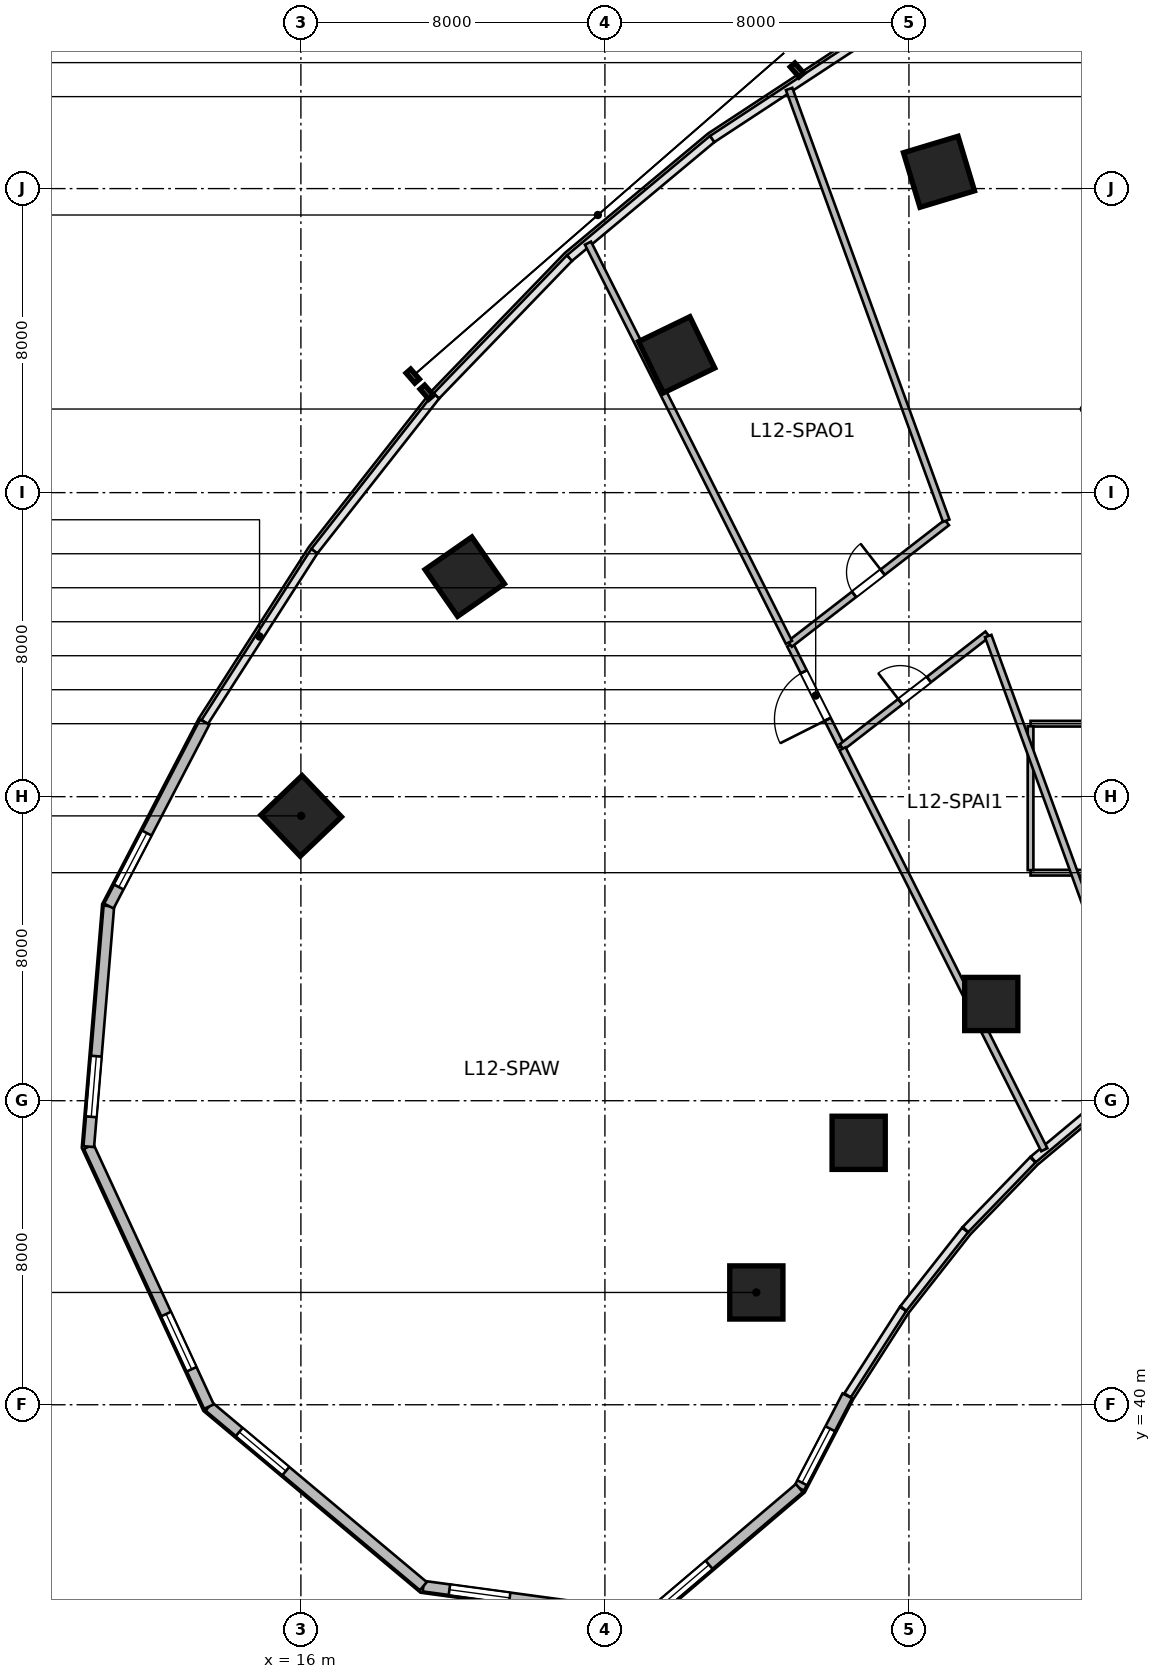
"""IFC4 building model, lengths in metres.
Left out: names, types, materials, properties, quantities, classifications, styles, units other than length and angle.
Written with IfcOpenShell. Run it as: python <this file> out.ifc"""

import sys

from ifc_helpers import new_model, si_unit, direction, frame, frame_2d, origin, origin_2d, place, context, subcontext, project, spatial, rectangle, circle, extrude, source, transform, mapped, element, fill, save


model = new_model("IFC4")
c1 = context("Model", 3, precision=1e-05, world=origin(), true_north=direction((0.0, 1.0)))
c2 = subcontext(c1, "Body", "Model", "MODEL_VIEW")
j1 = project(units=[si_unit("LENGTHUNIT", "METRE"), si_unit("PLANEANGLEUNIT", "RADIAN")], contexts=[c1])
p1 = place(None, origin())
s1 = spatial("IfcSite", under=j1, at=p1, CompositionType="ELEMENT")
p2 = place(p1, origin())
s2 = spatial("IfcBuilding", under=s1, at=p2, CompositionType="ELEMENT")
p3 = place(p2, frame((0.0, 0.0, 57.0)))
s3 = spatial("IfcBuildingStorey", under=s2, at=p3, CompositionType="ELEMENT", Elevation=57.0)
m1 = source(origin(), c2, "Body", "SweptSolid", [
    extrude(circle(Radius=0.7, at=origin_2d()), origin(), (0.0, 0.0, 1.0), 3.6),
])
p4 = place(p3, frame((27.985, 42.955, 0.0), z_axis=(0.0, 0.0, 1.0), x_axis=(-0.690756218984, 0.723087716626, 0.0)))
e1 = element("IfcColumn", 1, at=p4, inside=s3, PredefinedType="COLUMN", context=c2, shape_type="MappedRepresentation", body=[
    mapped(m1, transform((0.0, 0.0, 0.0), scale=1.0)),
])
m2 = source(origin(), c2, "Body", "SweptSolid", [
    extrude(rectangle(XDim=1.5, YDim=1.5, at=origin_2d()), origin(), (0.0, 0.0, 1.0), 3.6),
])
p5 = place(p3, frame((16.007, 55.494, 0.0), z_axis=(0.0, 0.0, 1.0), x_axis=(-0.690756218984, 0.723087716626, 0.0)))
e2 = element("IfcColumn", 2, at=p5, inside=s3, PredefinedType="COLUMN", context=c2, shape_type="MappedRepresentation", body=[
    mapped(m2, transform((0.0, 0.0, 0.0), scale=1.0)),
])
p6 = place(p3, frame((30.677, 46.892, 0.0), z_axis=(0.0, 0.0, 1.0), x_axis=(-0.571143442153, 0.820850271661, 0.0)))
e3 = element("IfcColumn", 3, at=p6, inside=s3, PredefinedType="COLUMN", context=c2, shape_type="MappedRepresentation", body=[
    mapped(m1, transform((0.0, 0.0, 0.0), scale=1.0)),
])
p7 = place(p3, frame((20.311, 61.789, 0.0), z_axis=(0.0, 0.0, 1.0), x_axis=(-0.571143442153, 0.820850271661, 0.0)))
e4 = element("IfcColumn", 4, at=p7, inside=s3, PredefinedType="COLUMN", context=c2, shape_type="MappedRepresentation", body=[
    mapped(m2, transform((0.0, 0.0, 0.0), scale=1.0)),
])
p8 = place(p3, frame((34.166, 50.545, 0.0), z_axis=(0.0, 0.0, 1.0), x_axis=(-0.436173672171, 0.899862504889, 0.0)))
e5 = element("IfcColumn", 5, at=p8, inside=s3, PredefinedType="COLUMN", context=c2, shape_type="MappedRepresentation", body=[
    mapped(m1, transform((0.0, 0.0, 0.0), scale=1.0)),
])
for number, where, z_axis, x_axis in (
    (6, (25.888, 67.627, 0.0), (0.0, 0.0, 1.0), (-0.436, 0.9, 0.0)),
    (7, (32.791, 72.442, 0.0), (0.0, 0.0, 1.0), (-0.289, 0.957, 0.0)),
):
    element("IfcColumn", number, at=place(p3, frame(where, z_axis=z_axis, x_axis=x_axis)), inside=s3, PredefinedType="COLUMN", context=c2, shape_type="MappedRepresentation", body=[
        mapped(m2, transform((0.0, 0.0, 0.0), scale=1.0)),
    ])
m3 = source(origin(), c2, "Body", "SweptSolid", [
    extrude(rectangle(XDim=2.735, YDim=0.28, at=frame_2d((1.368, 0.0))), origin(), (0.0, 0.0, 1.0), 3.36),
])
p9 = place(p3, frame((30.378, 40.234, 0.0), z_axis=(0.0, 0.0, 1.0), x_axis=(-0.46179107292, -0.886988728774, 0.0)))
e8 = element("IfcWall", 8, at=p9, inside=s3, PredefinedType="SOLIDWALL", context=c2, shape_type="MappedRepresentation", body=[
    mapped(m3, transform((0.0, 0.0, 0.0), scale=1.0)),
])
p10 = place(p9, frame((0.976, 0.0, 0.95)))
e9 = element("IfcOpeningElement", 9, at=p10, cuts=e8, PredefinedType="OPENING", context=c2, shape_type="SweptSolid", body=[
    extrude(rectangle(XDim=1.6, YDim=1.9, at=frame_2d((0.8, 0.95))), frame((0.0, 0.15, 0.0), z_axis=(0.0, -1.0, 0.0), x_axis=(1.0, 0.0, 0.0)), (0.0, 0.0, 1.0), 0.3),
])
m4 = source(origin(), c2, "Body", "SweptSolid", [
    extrude(rectangle(XDim=5.222, YDim=0.28, at=frame_2d((2.611, 0.0))), origin(), (0.0, 0.0, 1.0), 3.36),
])
p11 = place(p3, frame((29.115, 37.807, 0.0), z_axis=(0.0, 0.0, 1.0), x_axis=(-0.761900099546, -0.647694556339, 0.0)))
e10 = element("IfcWall", 10, at=p11, inside=s3, PredefinedType="SOLIDWALL", context=c2, shape_type="MappedRepresentation", body=[
    mapped(m4, transform((0.0, 0.0, 0.0), scale=1.0)),
])
p12 = place(p11, frame((3.117, 0.0, 0.95)))
e11 = element("IfcOpeningElement", 11, at=p12, cuts=e10, PredefinedType="OPENING", context=c2, shape_type="SweptSolid", body=[
    extrude(rectangle(XDim=1.6, YDim=1.9, at=frame_2d((0.8, 0.95))), frame((0.0, 0.15, 0.0), z_axis=(0.0, -1.0, 0.0), x_axis=(1.0, 0.0, 0.0)), (0.0, 0.0, 1.0), 0.3),
])
m5 = source(origin(), c2, "Body", "SweptSolid", [
    extrude(rectangle(XDim=5.967, YDim=0.28, at=frame_2d((2.984, 0.0))), origin(), (0.0, 0.0, 1.0), 3.36),
])
p13 = place(p3, frame((25.136, 34.425, 0.0), z_axis=(0.0, 0.0, 1.0), x_axis=(-0.990927009341, 0.134401124099, 0.0)))
e12 = element("IfcWall", 12, at=p13, inside=s3, PredefinedType="SOLIDWALL", context=c2, shape_type="MappedRepresentation", body=[
    mapped(m5, transform((0.0, 0.0, 0.0), scale=1.0)),
])
p14 = place(p13, frame((3.676, 0.0, 0.95)))
e13 = element("IfcOpeningElement", 13, at=p14, cuts=e12, PredefinedType="OPENING", context=c2, shape_type="SweptSolid", body=[
    extrude(rectangle(XDim=1.6, YDim=1.9, at=frame_2d((0.8, 0.95))), frame((0.0, 0.15, 0.0), z_axis=(0.0, -1.0, 0.0), x_axis=(1.0, 0.0, 0.0)), (0.0, 0.0, 1.0), 0.3),
])
m6 = source(origin(), c2, "Body", "SweptSolid", [
    extrude(rectangle(XDim=7.359, YDim=0.28, at=frame_2d((3.679, 0.0))), origin(), (0.0, 0.0, 1.0), 3.36),
])
p15 = place(p3, frame((19.223, 35.227, 0.0), z_axis=(0.0, 0.0, 1.0), x_axis=(-0.766737165543, 0.641961150675, 0.0)))
e14 = element("IfcWall", 14, at=p15, inside=s3, PredefinedType="SOLIDWALL", context=c2, shape_type="MappedRepresentation", body=[
    mapped(m6, transform((0.0, 0.0, 0.0), scale=1.0)),
])
p16 = place(p15, frame((4.719, 0.0, 0.95)))
e15 = element("IfcOpeningElement", 15, at=p16, cuts=e14, PredefinedType="OPENING", context=c2, shape_type="SweptSolid", body=[
    extrude(rectangle(XDim=1.6, YDim=1.9, at=frame_2d((0.8, 0.95))), frame((0.0, 0.15, 0.0), z_axis=(0.0, -1.0, 0.0), x_axis=(1.0, 0.0, 0.0)), (0.0, 0.0, 1.0), 0.3),
])
m7 = source(origin(), c2, "Body", "SweptSolid", [
    extrude(rectangle(XDim=7.536, YDim=0.28, at=frame_2d((3.768, 0.0))), origin(), (0.0, 0.0, 1.0), 3.36),
])
p17 = place(p3, frame((13.58, 39.951, 0.0), z_axis=(0.0, 0.0, 1.0), x_axis=(-0.41964973873, 0.907686122393, 0.0)))
e16 = element("IfcWall", 16, at=p17, inside=s3, PredefinedType="SOLIDWALL", context=c2, shape_type="MappedRepresentation", body=[
    mapped(m7, transform((0.0, 0.0, 0.0), scale=1.0)),
])
p18 = place(p17, frame((1.084, 0.0, 0.95)))
e17 = element("IfcOpeningElement", 17, at=p18, cuts=e16, PredefinedType="OPENING", context=c2, shape_type="SweptSolid", body=[
    extrude(rectangle(XDim=1.6, YDim=1.9, at=frame_2d((0.8, 0.95))), frame((0.0, 0.15, 0.0), z_axis=(0.0, -1.0, 0.0), x_axis=(1.0, 0.0, 0.0)), (0.0, 0.0, 1.0), 0.3),
])
m8 = source(origin(), c2, "Body", "SweptSolid", [
    extrude(rectangle(XDim=6.353, YDim=0.28, at=frame_2d((3.176, 0.0))), origin(), (0.0, 0.0, 1.0), 3.36),
])
p19 = place(p3, frame((10.418, 46.792, 0.0), z_axis=(0.0, 0.0, 1.0), x_axis=(0.083319001377, 0.996522926986, 0.0)))
e18 = element("IfcWall", 18, at=p19, inside=s3, PredefinedType="SOLIDWALL", context=c2, shape_type="MappedRepresentation", body=[
    mapped(m8, transform((0.0, 0.0, 0.0), scale=1.0)),
])
p20 = place(p19, frame((0.788, 0.0, 0.95)))
e19 = element("IfcOpeningElement", 19, at=p20, cuts=e18, PredefinedType="OPENING", context=c2, shape_type="SweptSolid", body=[
    extrude(rectangle(XDim=1.6, YDim=1.9, at=frame_2d((0.8, 0.95))), frame((0.0, 0.15, 0.0), z_axis=(0.0, -1.0, 0.0), x_axis=(1.0, 0.0, 0.0)), (0.0, 0.0, 1.0), 0.3),
])
m9 = source(origin(), c2, "Body", "SweptSolid", [
    extrude(rectangle(XDim=5.459, YDim=0.28, at=frame_2d((2.73, 0.0))), origin(), (0.0, 0.0, 1.0), 3.36),
])
p21 = place(p3, frame((10.947, 53.122, 0.0), z_axis=(0.0, 0.0, 1.0), x_axis=(0.461768054321, 0.887000712518, 0.0)))
e20 = element("IfcWall", 20, at=p21, inside=s3, PredefinedType="SOLIDWALL", context=c2, shape_type="MappedRepresentation", body=[
    mapped(m9, transform((0.0, 0.0, 0.0), scale=1.0)),
])
p22 = place(p21, frame((0.565, 0.0, 0.95)))
e21 = element("IfcOpeningElement", 21, at=p22, cuts=e20, PredefinedType="OPENING", context=c2, shape_type="SweptSolid", body=[
    extrude(rectangle(XDim=1.6, YDim=1.9, at=frame_2d((0.8, 0.95))), frame((0.0, 0.15, 0.0), z_axis=(0.0, -1.0, 0.0), x_axis=(1.0, 0.0, 0.0)), (0.0, 0.0, 1.0), 0.3),
])
m10 = source(origin(), c2, "Body", "SweptSolid", [
    extrude(rectangle(XDim=6.6, YDim=0.15, at=frame_2d((3.3, 0.0))), origin(), (0.0, 0.0, 1.0), 2.803),
])
p23 = place(p3, frame((35.2, 54.0, 0.0), z_axis=(0.0, 0.0, 1.0), x_axis=(1.0, 0.0, 0.0)))
e22 = element("IfcWall", 22, at=p23, inside=s3, PredefinedType="PARTITIONING", context=c2, shape_type="MappedRepresentation", body=[
    mapped(m10, transform((0.0, 0.0, 0.0), scale=1.0)),
])
m11 = source(origin(), c2, "Body", "SweptSolid", [
    extrude(rectangle(XDim=6.6, YDim=0.15, at=frame_2d((3.3, 0.0))), origin(), (0.0, 0.0, 1.0), 3.36),
])
p24 = place(p3, frame((35.2, 57.92, 0.0), z_axis=(0.0, 0.0, 1.0), x_axis=(1.0, 0.0, 0.0)))
e23 = element("IfcWall", 23, at=p24, inside=s3, PredefinedType="PARTITIONING", context=c2, shape_type="MappedRepresentation", body=[
    mapped(m11, transform((0.0, 0.0, 0.0), scale=1.0)),
])
p25 = place(p24, frame((2.85, 0.0, 0.0)))
e24 = element("IfcOpeningElement", 24, at=p25, cuts=e23, PredefinedType="OPENING", context=c2, shape_type="SweptSolid", body=[
    extrude(rectangle(XDim=0.9, YDim=2.1, at=frame_2d((0.45, 1.05))), frame((0.0, 0.085, 0.0), z_axis=(0.0, -1.0, 0.0), x_axis=(1.0, 0.0, 0.0)), (0.0, 0.0, 1.0), 0.17),
])
m12 = source(origin(), c2, "Body", "SweptSolid", [
    extrude(rectangle(XDim=3.785, YDim=0.15, at=frame_2d((1.893, 0.0))), origin(), (0.0, 0.0, 1.0), 3.36),
])
p26 = place(p3, frame((35.2, 54.067, 0.0), z_axis=(0.0, 0.0, 1.0), x_axis=(0.0, 1.0, 0.0)))
e25 = element("IfcWall", 25, at=p26, inside=s3, PredefinedType="PARTITIONING", context=c2, shape_type="MappedRepresentation", body=[
    mapped(m12, transform((0.0, 0.0, 0.0), scale=1.0)),
])
m13 = source(origin(), c2, "Body", "SweptSolid", [
    extrude(rectangle(XDim=2.985, YDim=0.18, at=frame_2d((1.493, 0.0))), origin(), (0.0, 0.0, 1.0), 3.36),
])
p27 = place(p3, frame((30.218, 57.327, 0.0), z_axis=(0.0, 0.0, 1.0), x_axis=(-0.449665526069, 0.893197018952, 0.0)))
e26 = element("IfcWall", 26, at=p27, inside=s3, PredefinedType="PLUMBINGWALL", context=c2, shape_type="MappedRepresentation", body=[
    mapped(m13, transform((0.0, 0.0, 0.0), scale=1.0)),
])
p28 = place(p27, frame((0.792, 0.0, 0.0)))
e27 = element("IfcOpeningElement", 27, at=p28, cuts=e26, PredefinedType="OPENING", context=c2, shape_type="SweptSolid", body=[
    extrude(rectangle(XDim=1.4, YDim=2.15, at=frame_2d((0.7, 1.075))), frame((0.0, 0.1, 0.0), z_axis=(0.0, -1.0, 0.0), x_axis=(1.0, 0.0, 0.0)), (0.0, 0.0, 1.0), 0.2),
])
m14 = source(origin(), c2, "Body", "SweptSolid", [
    extrude(rectangle(XDim=5.227, YDim=0.18, at=frame_2d((2.614, 0.0))), origin(), (0.0, 0.0, 1.0), 3.36),
])
p29 = place(p3, frame((28.865, 60.015, 0.0), z_axis=(0.0, 0.0, 1.0), x_axis=(0.790908912792, 0.61193389485, 0.0)))
e28 = element("IfcWall", 28, at=p29, inside=s3, PredefinedType="PLUMBINGWALL", context=c2, shape_type="MappedRepresentation", body=[
    mapped(m14, transform((0.0, 0.0, 0.0), scale=1.0)),
])
p30 = place(p29, frame((2.139, 0.0, 0.0)))
e29 = element("IfcOpeningElement", 29, at=p30, cuts=e28, PredefinedType="OPENING", context=c2, shape_type="SweptSolid", body=[
    extrude(rectangle(XDim=0.95, YDim=2.1, at=frame_2d((0.475, 1.05))), frame((0.0, 0.1, 0.0), z_axis=(0.0, -1.0, 0.0), x_axis=(1.0, 0.0, 0.0)), (0.0, 0.0, 1.0), 0.2),
])
m15 = source(origin(), c2, "Body", "SweptSolid", [
    extrude(rectangle(XDim=11.761, YDim=0.18, at=frame_2d((5.88, 0.0))), origin(), (0.0, 0.0, 1.0), 3.36),
])
p31 = place(p3, frame((28.842, 60.06, 0.0), z_axis=(0.0, 0.0, 1.0), x_axis=(-0.449611686329, 0.893224121661, 0.0)))
e30 = element("IfcWall", 30, at=p31, inside=s3, PredefinedType="PLUMBINGWALL", context=c2, shape_type="MappedRepresentation", body=[
    mapped(m15, transform((0.0, 0.0, 0.0), scale=1.0)),
])
m16 = source(origin(), c2, "Body", "SweptSolid", [
    extrude(rectangle(XDim=12.088, YDim=0.18, at=frame_2d((6.044, 0.0))), origin(), (0.0, 0.0, 1.0), 3.36),
])
p32 = place(p3, frame((32.981, 63.262, 0.0), z_axis=(0.0, 0.0, 1.0), x_axis=(-0.34203007529, 0.939689005787, 0.0)))
e31 = element("IfcWall", 31, at=p32, inside=s3, PredefinedType="PLUMBINGWALL", context=c2, shape_type="MappedRepresentation", body=[
    mapped(m16, transform((0.0, 0.0, 0.0), scale=1.0)),
])
m17 = source(origin(), c2, "Body", "SweptSolid", [
    extrude(rectangle(XDim=4.855, YDim=0.18, at=frame_2d((2.427, 0.0))), origin(), (0.0, 0.0, 1.0), 3.36),
])
p33 = place(p3, frame((30.229, 57.305, 0.0), z_axis=(0.0, 0.0, 1.0), x_axis=(0.790930965655, 0.611905391028, 0.0)))
e32 = element("IfcWall", 32, at=p33, inside=s3, PredefinedType="PLUMBINGWALL", context=c2, shape_type="MappedRepresentation", body=[
    mapped(m17, transform((0.0, 0.0, 0.0), scale=1.0)),
])
p34 = place(p33, frame((1.952, 0.0, 0.0)))
e33 = element("IfcOpeningElement", 33, at=p34, cuts=e32, PredefinedType="OPENING", context=c2, shape_type="SweptSolid", body=[
    extrude(rectangle(XDim=0.95, YDim=2.1, at=frame_2d((0.475, 1.05))), frame((0.0, 0.1, 0.0), z_axis=(0.0, -1.0, 0.0), x_axis=(1.0, 0.0, 0.0)), (0.0, 0.0, 1.0), 0.2),
])
m18 = source(origin(), c2, "Body", "SweptSolid", [
    extrude(rectangle(XDim=11.811, YDim=0.18, at=frame_2d((5.906, 0.0))), origin(), (0.0, 0.0, 1.0), 3.36),
])
p35 = place(p3, frame((35.562, 46.71, 0.0), z_axis=(0.0, 0.0, 1.0), x_axis=(-0.449626289102, 0.893216771086, 0.0)))
e34 = element("IfcWall", 34, at=p35, inside=s3, PredefinedType="PLUMBINGWALL", context=c2, shape_type="MappedRepresentation", body=[
    mapped(m18, transform((0.0, 0.0, 0.0), scale=1.0)),
])
m19 = source(origin(), c2, "Body", "SweptSolid", [
    extrude(rectangle(XDim=12.196, YDim=0.18, at=frame_2d((6.098, 0.0))), origin(), (0.0, 0.0, 1.0), 3.36),
])
p36 = place(p3, frame((38.258, 48.766, 0.0), z_axis=(0.0, 0.0, 1.0), x_axis=(-0.342022711534, 0.939691686031, 0.0)))
e35 = element("IfcWall", 35, at=p36, inside=s3, PredefinedType="PLUMBINGWALL", context=c2, shape_type="MappedRepresentation", body=[
    mapped(m19, transform((0.0, 0.0, 0.0), scale=1.0)),
])
m20 = source(origin(), c2, "Body", "SweptSolid", [
    extrude(rectangle(XDim=1.6, YDim=1.9, at=frame_2d((0.8, 0.95))), frame((0.0, 0.03, 0.0), z_axis=(0.0, -1.0, 0.0), x_axis=(1.0, 0.0, 0.0)), (0.0, 0.0, 1.0), 0.06),
])
p37 = place(p10, origin())
e36 = element("IfcWindow", 36, at=p37, inside=s3, PartitioningType="SINGLE_PANEL", PredefinedType="WINDOW", context=c2, shape_type="MappedRepresentation", body=[
    mapped(m20, transform((0.0, 0.0, 0.0), scale=1.0)),
])
fill(e9, e36)
p38 = place(p12, origin())
e37 = element("IfcWindow", 37, at=p38, inside=s3, PartitioningType="SINGLE_PANEL", PredefinedType="WINDOW", context=c2, shape_type="MappedRepresentation", body=[
    mapped(m20, transform((0.0, 0.0, 0.0), scale=1.0)),
])
fill(e11, e37)
p39 = place(p14, origin())
e38 = element("IfcWindow", 38, at=p39, inside=s3, PartitioningType="SINGLE_PANEL", PredefinedType="WINDOW", context=c2, shape_type="MappedRepresentation", body=[
    mapped(m20, transform((0.0, 0.0, 0.0), scale=1.0)),
])
fill(e13, e38)
p40 = place(p16, origin())
e39 = element("IfcWindow", 39, at=p40, inside=s3, PartitioningType="SINGLE_PANEL", PredefinedType="WINDOW", context=c2, shape_type="MappedRepresentation", body=[
    mapped(m20, transform((0.0, 0.0, 0.0), scale=1.0)),
])
fill(e15, e39)
p41 = place(p18, origin())
e40 = element("IfcWindow", 40, at=p41, inside=s3, PartitioningType="SINGLE_PANEL", PredefinedType="WINDOW", context=c2, shape_type="MappedRepresentation", body=[
    mapped(m20, transform((0.0, 0.0, 0.0), scale=1.0)),
])
fill(e17, e40)
p42 = place(p20, origin())
e41 = element("IfcWindow", 41, at=p42, inside=s3, PartitioningType="SINGLE_PANEL", PredefinedType="WINDOW", context=c2, shape_type="MappedRepresentation", body=[
    mapped(m20, transform((0.0, 0.0, 0.0), scale=1.0)),
])
fill(e19, e41)
p43 = place(p22, origin())
e42 = element("IfcWindow", 42, at=p43, inside=s3, PartitioningType="SINGLE_PANEL", PredefinedType="WINDOW", context=c2, shape_type="MappedRepresentation", body=[
    mapped(m20, transform((0.0, 0.0, 0.0), scale=1.0)),
])
fill(e21, e42)
m21 = source(origin(), c2, "Body", "SweptSolid", [
    extrude(rectangle(XDim=1.4, YDim=2.15, at=frame_2d((0.7, 1.075))), frame((0.0, 0.025, 0.0), z_axis=(0.0, -1.0, 0.0), x_axis=(1.0, 0.0, 0.0)), (0.0, 0.0, 1.0), 0.05),
])
p44 = place(p28, origin())
e43 = element("IfcDoor", 43, at=p44, inside=s3, OperationType="SINGLE_SWING_LEFT", PredefinedType="DOOR", context=c2, shape_type="MappedRepresentation", body=[
    mapped(m21, transform((0.0, 0.0, 0.0), scale=1.0)),
])
fill(e27, e43)
m22 = source(origin(), c2, "Body", "SweptSolid", [
    extrude(rectangle(XDim=0.95, YDim=2.1, at=frame_2d((0.475, 1.05))), frame((0.0, 0.025, 0.0), z_axis=(0.0, -1.0, 0.0), x_axis=(1.0, 0.0, 0.0)), (0.0, 0.0, 1.0), 0.05),
])
p45 = place(p30, origin())
e44 = element("IfcDoor", 44, at=p45, inside=s3, OperationType="SINGLE_SWING_RIGHT", PredefinedType="DOOR", context=c2, shape_type="MappedRepresentation", body=[
    mapped(m22, transform((0.0, 0.0, 0.0), scale=1.0)),
])
fill(e29, e44)
p46 = place(p34, origin())
e45 = element("IfcDoor", 45, at=p46, inside=s3, OperationType="SINGLE_SWING_LEFT", PredefinedType="DOOR", context=c2, shape_type="MappedRepresentation", body=[
    mapped(m22, transform((0.0, 0.0, 0.0), scale=1.0)),
])
fill(e33, e45)
save(model, sys.argv[1])
